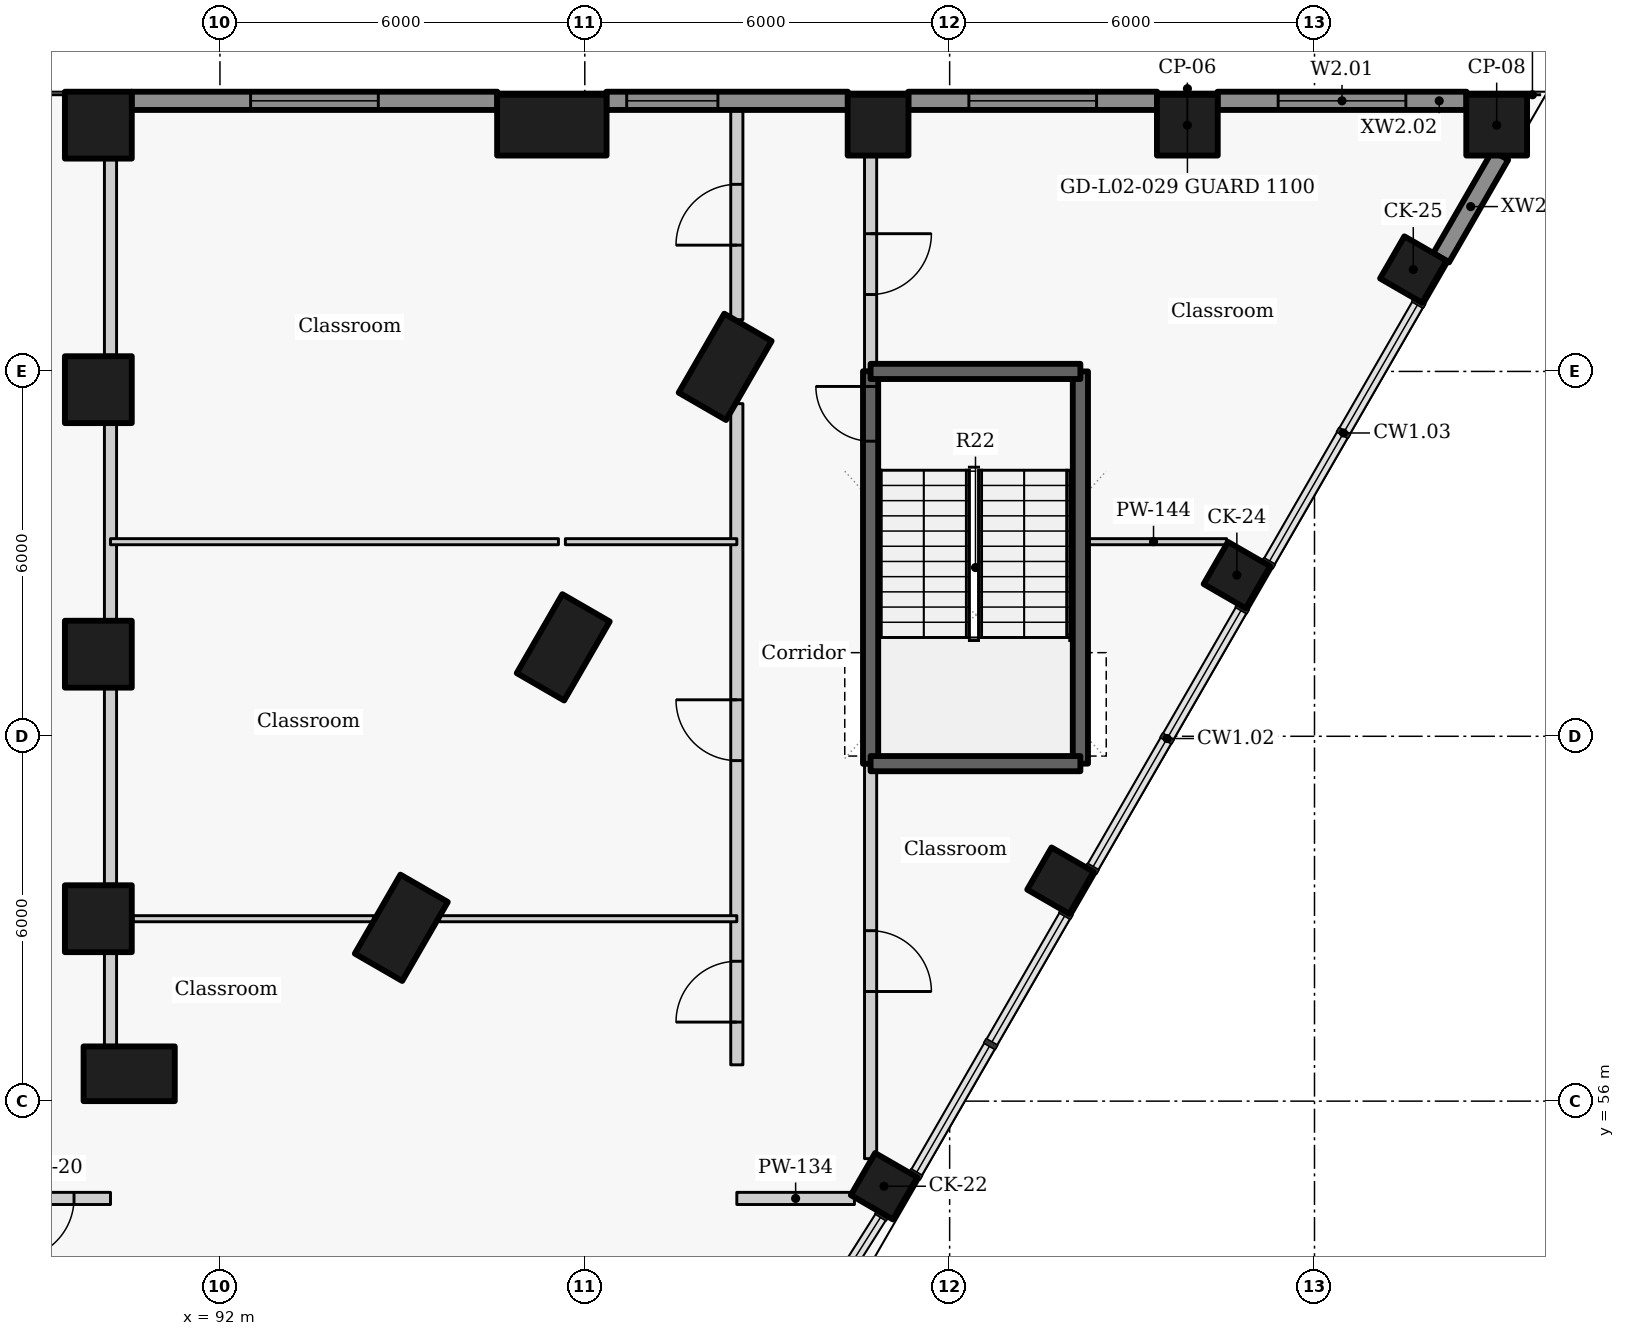
"""IFC4 building model, lengths in metres.
Left out: names, types, materials, properties, quantities, classifications, styles, units other than length and angle.
Written with IfcOpenShell. Run it as: python <this file> out.ifc"""

import sys

from ifc_helpers import new_model, si_unit, direction, frame, frame_2d, origin, origin_2d, place, context, subcontext, project, spatial, rectangle, extrude, element, fill, save


model = new_model("IFC4")
c1 = context("Model", 3, precision=1e-05, world=origin(), true_north=direction((0.0, 1.0)))
c2 = subcontext(c1, "Body", "Model", "MODEL_VIEW")
j1 = project(units=[si_unit("LENGTHUNIT", "METRE"), si_unit("PLANEANGLEUNIT", "RADIAN")], contexts=[c1])
p1 = place(None, origin())
s1 = spatial("IfcSite", under=j1, at=p1, CompositionType="ELEMENT")
p2 = place(p1, origin())
s2 = spatial("IfcBuilding", under=s1, at=p2, CompositionType="ELEMENT")
p3 = place(p2, frame((0.0, 0.0, 11.4)))
s3 = spatial("IfcBuildingStorey", under=s2, at=p3, CompositionType="ELEMENT", Elevation=11.4)
for number, where, z_axis, x_axis in (
    (1, (90.507, 56.45, 0.0), (0.0, 0.0, 1.0), (1.0, 0.0, 0.0)),
    (2, (94.982, 58.851, 0.0), (0.0, 0.0, 1.0), (0.5, 0.866, 0.0)),
    (3, (97.646, 63.463, 0.0), (0.0, 0.0, 1.0), (0.5, 0.866, 0.0)),
    (4, (100.308, 68.075, 0.0), (0.0, 0.0, 1.0), (0.5, 0.866, 0.0)),
):
    element("IfcColumn", number, at=place(p3, frame(where, z_axis=z_axis, x_axis=x_axis)), inside=s3, PredefinedType="COLUMN", context=c2, shape_type="SweptSolid", body=[
        extrude(rectangle(XDim=1.5, YDim=0.9, at=origin_2d()), origin(), (0.0, 0.0, 1.0), 4.2),
    ])
for number, where, z_axis, x_axis in (
    (5, (90.0, 59.0, 0.0), (0.0, 0.0, 1.0), (0.0, 1.0, 0.0)),
    (6, (90.0, 63.35, 0.0), (0.0, 0.0, 1.0), (0.0, 1.0, 0.0)),
    (7, (90.0, 67.7, 0.0), (0.0, 0.0, 1.0), (0.0, 1.0, 0.0)),
    (8, (90.0, 72.05, 0.0), (0.0, 0.0, 1.0), (0.0, 1.0, 0.0)),
):
    element("IfcColumn", number, at=place(p3, frame(where, z_axis=z_axis, x_axis=x_axis)), inside=s3, PredefinedType="COLUMN", context=c2, shape_type="SweptSolid", body=[
        extrude(rectangle(XDim=1.1, YDim=1.1, at=origin_2d()), origin(), (0.0, 0.0, 1.0), 4.2),
    ])
for number, where, z_axis, x_axis in (
    (9, (102.921, 54.6, 0.0), (0.0, 0.0, 1.0), (0.5, 0.866, 0.0)),
    (10, (105.822, 59.625, 0.0), (0.0, 0.0, 1.0), (0.5, 0.866, 0.0)),
    (11, (108.723, 64.65, 0.0), (0.0, 0.0, 1.0), (0.5, 0.866, 0.0)),
    (12, (111.625, 69.675, 0.0), (0.0, 0.0, 1.0), (0.5, 0.866, 0.0)),
):
    element("IfcColumn", number, at=place(p3, frame(where, z_axis=z_axis, x_axis=x_axis)), inside=s3, PredefinedType="COLUMN", context=c2, shape_type="SweptSolid", body=[
        extrude(rectangle(XDim=0.8, YDim=0.8, at=origin_2d()), origin(), (0.0, 0.0, 1.0), 4.2),
    ])
p4 = place(p3, frame((97.458, 72.05, 0.0), z_axis=(0.0, 0.0, 1.0), x_axis=(1.0, 0.0, 0.0)))
e13 = element("IfcColumn", 13, at=p4, inside=s3, PredefinedType="COLUMN", context=c2, shape_type="SweptSolid", body=[
    extrude(rectangle(XDim=1.8, YDim=1.0, at=origin_2d()), origin(), (0.0, 0.0, 1.0), 4.2),
])
for number, where, z_axis, x_axis in (
    (14, (102.823, 72.05, 0.0), (0.0, 0.0, 1.0), (1.0, 0.0, 0.0)),
    (15, (107.909, 72.05, 0.0), (0.0, 0.0, 1.0), (1.0, 0.0, 0.0)),
    (16, (112.996, 72.05, 0.0), (0.0, 0.0, 1.0), (1.0, 0.0, 0.0)),
):
    element("IfcColumn", number, at=place(p3, frame(where, z_axis=z_axis, x_axis=x_axis)), inside=s3, PredefinedType="COLUMN", context=c2, shape_type="SweptSolid", body=[
        extrude(rectangle(XDim=1.0, YDim=1.0, at=origin_2d()), origin(), (0.0, 0.0, 1.0), 4.2),
    ])
p5 = place(p3, frame((112.082, 69.868, 0.0), z_axis=(0.0, 0.0, 1.0), x_axis=(0.500051850797, 0.865995465643, 0.0)))
e17 = element("IfcWall", 17, at=p5, inside=s3, PredefinedType="SOLIDWALL", context=c2, shape_type="SweptSolid", body=[
    extrude(rectangle(XDim=1.946, YDim=0.3, at=frame_2d((0.973, 0.0))), origin(), (0.0, 0.0, 1.0), 3.0),
])
p6 = place(p3, frame((112.5, 72.45, 0.0), z_axis=(0.0, 0.0, 1.0), x_axis=(-1.0, 0.0, 0.0)))
e18 = element("IfcWall", 18, at=p6, inside=s3, PredefinedType="SOLIDWALL", context=c2, shape_type="SweptSolid", body=[
    extrude(rectangle(XDim=4.095, YDim=0.3, at=frame_2d((2.047, 0.0))), origin(), (0.0, 0.0, 1.0), 3.0),
])
p7 = place(p6, frame((0.998, 0.0, 0.9)))
e19 = element("IfcOpeningElement", 19, at=p7, cuts=e18, PredefinedType="OPENING", context=c2, shape_type="SweptSolid", body=[
    extrude(rectangle(XDim=2.1, YDim=2.05, at=frame_2d((1.05, 1.025))), frame((0.0, 0.16, 0.0), z_axis=(0.0, -1.0, 0.0), x_axis=(1.0, 0.0, 0.0)), (0.0, 0.0, 1.0), 0.32),
])
p8 = place(p3, frame((107.413, 72.45, 0.0), z_axis=(0.0, 0.0, 1.0), x_axis=(-1.0, 0.0, 0.0)))
e20 = element("IfcWall", 20, at=p8, inside=s3, PredefinedType="SOLIDWALL", context=c2, shape_type="SweptSolid", body=[
    extrude(rectangle(XDim=4.094, YDim=0.3, at=frame_2d((2.047, 0.0))), origin(), (0.0, 0.0, 1.0), 3.0),
])
p9 = place(p8, frame((0.997, 0.0, 0.9)))
e21 = element("IfcOpeningElement", 21, at=p9, cuts=e20, PredefinedType="OPENING", context=c2, shape_type="SweptSolid", body=[
    extrude(rectangle(XDim=2.1, YDim=2.05, at=frame_2d((1.05, 1.025))), frame((0.0, 0.16, 0.0), z_axis=(0.0, -1.0, 0.0), x_axis=(1.0, 0.0, 0.0)), (0.0, 0.0, 1.0), 0.32),
])
p10 = place(p3, frame((102.327, 72.45, 0.0), z_axis=(0.0, 0.0, 1.0), x_axis=(-1.0, 0.0, 0.0)))
e22 = element("IfcWall", 22, at=p10, inside=s3, PredefinedType="SOLIDWALL", context=c2, shape_type="SweptSolid", body=[
    extrude(rectangle(XDim=3.973, YDim=0.3, at=frame_2d((1.986, 0.0))), origin(), (0.0, 0.0, 1.0), 3.0),
])
p11 = place(p10, frame((2.138, 0.0, 0.9)))
e23 = element("IfcOpeningElement", 23, at=p11, cuts=e22, PredefinedType="OPENING", context=c2, shape_type="SweptSolid", body=[
    extrude(rectangle(XDim=1.5, YDim=2.05, at=frame_2d((0.75, 1.025))), frame((0.0, 0.16, 0.0), z_axis=(0.0, -1.0, 0.0), x_axis=(1.0, 0.0, 0.0)), (0.0, 0.0, 1.0), 0.32),
])
p12 = place(p3, frame((96.562, 72.45, 0.0), z_axis=(0.0, 0.0, 1.0), x_axis=(-1.0, 0.0, 0.0)))
e24 = element("IfcWall", 24, at=p12, inside=s3, PredefinedType="SOLIDWALL", context=c2, shape_type="SweptSolid", body=[
    extrude(rectangle(XDim=6.016, YDim=0.3, at=frame_2d((3.008, 0.0))), origin(), (0.0, 0.0, 1.0), 3.0),
])
p13 = place(p12, frame((1.958, 0.0, 0.9)))
e25 = element("IfcOpeningElement", 25, at=p13, cuts=e24, PredefinedType="OPENING", context=c2, shape_type="SweptSolid", body=[
    extrude(rectangle(XDim=2.1, YDim=2.05, at=frame_2d((1.05, 1.025))), frame((0.0, 0.16, 0.0), z_axis=(0.0, -1.0, 0.0), x_axis=(1.0, 0.0, 0.0)), (0.0, 0.0, 1.0), 0.32),
])
p14 = place(p3, frame((102.7, 61.547, -0.3), z_axis=(0.0, 0.0, 1.0), x_axis=(0.0, 1.0, 0.0)))
e26 = element("IfcWall", 26, at=p14, inside=s3, PredefinedType="SHEAR", context=c2, shape_type="SweptSolid", body=[
    extrude(rectangle(XDim=6.456, YDim=0.25, at=frame_2d((3.228, 0.0))), origin(), (0.0, 0.0, 1.0), 4.2),
])
p15 = place(p14, frame((5.306, 0.0, 0.3)))
e27 = element("IfcOpeningElement", 27, at=p15, cuts=e26, PredefinedType="OPENING", context=c2, shape_type="SweptSolid", body=[
    extrude(rectangle(XDim=0.9, YDim=2.1, at=frame_2d((0.45, 1.05))), frame((0.0, 0.135, 0.0), z_axis=(0.0, -1.0, 0.0), x_axis=(1.0, 0.0, 0.0)), (0.0, 0.0, 1.0), 0.27),
])
p16 = place(p3, frame((102.7, 61.553, 0.0), z_axis=(0.0, 0.0, 1.0), x_axis=(0.0, -1.0, 0.0)))
e28 = element("IfcWall", 28, at=p16, inside=s3, PredefinedType="PARTITIONING", context=c2, shape_type="SweptSolid", body=[
    extrude(rectangle(XDim=6.499, YDim=0.2, at=frame_2d((3.249, 0.0))), origin(), (0.0, 0.0, 1.0), 3.9),
])
p17 = place(p16, frame((2.75, 0.0, 0.0)))
e29 = element("IfcOpeningElement", 29, at=p17, cuts=e28, PredefinedType="OPENING", context=c2, shape_type="SweptSolid", body=[
    extrude(rectangle(XDim=1.0, YDim=2.1, at=frame_2d((0.5, 1.05))), frame((0.0, 0.11, 0.0), z_axis=(0.0, -1.0, 0.0), x_axis=(1.0, 0.0, 0.0)), (0.0, 0.0, 1.0), 0.22),
])
p18 = place(p3, frame((102.7, 71.533, 0.0), z_axis=(0.0, 0.0, 1.0), x_axis=(0.0, -1.0, 0.0)))
e30 = element("IfcWall", 30, at=p18, inside=s3, PredefinedType="PARTITIONING", context=c2, shape_type="SweptSolid", body=[
    extrude(rectangle(XDim=3.536, YDim=0.2, at=frame_2d((1.768, 0.0))), origin(), (0.0, 0.0, 1.0), 3.9),
])
p19 = place(p18, frame((1.268, 0.0, 0.0)))
e31 = element("IfcOpeningElement", 31, at=p19, cuts=e30, PredefinedType="OPENING", context=c2, shape_type="SweptSolid", body=[
    extrude(rectangle(XDim=1.0, YDim=2.1, at=frame_2d((0.5, 1.05))), frame((0.0, 0.11, 0.0), z_axis=(0.0, -1.0, 0.0), x_axis=(1.0, 0.0, 0.0)), (0.0, 0.0, 1.0), 0.22),
])
p20 = place(p3, frame((100.5, 56.597, 0.0), z_axis=(0.0, 0.0, 1.0), x_axis=(0.0, 1.0, 0.0)))
e32 = element("IfcWall", 32, at=p20, inside=s3, PredefinedType="PARTITIONING", context=c2, shape_type="SweptSolid", body=[
    extrude(rectangle(XDim=10.873, YDim=0.2, at=frame_2d((5.437, 0.0))), origin(), (0.0, 0.0, 1.0), 3.9),
])
p21 = place(p20, frame((5.003, 0.0, 0.0)))
e33 = element("IfcOpeningElement", 33, at=p21, cuts=e32, PredefinedType="OPENING", context=c2, shape_type="SweptSolid", body=[
    extrude(rectangle(XDim=1.0, YDim=2.1, at=frame_2d((0.5, 1.05))), frame((0.0, 0.11, 0.0), z_axis=(0.0, -1.0, 0.0), x_axis=(1.0, 0.0, 0.0)), (0.0, 0.0, 1.0), 0.22),
])
p22 = place(p20, frame((0.703, 0.0, 0.0)))
e34 = element("IfcOpeningElement", 34, at=p22, cuts=e32, PredefinedType="OPENING", context=c2, shape_type="SweptSolid", body=[
    extrude(rectangle(XDim=1.0, YDim=2.1, at=frame_2d((0.5, 1.05))), frame((0.0, 0.11, 0.0), z_axis=(0.0, -1.0, 0.0), x_axis=(1.0, 0.0, 0.0)), (0.0, 0.0, 1.0), 0.22),
])
p23 = place(p3, frame((100.5, 68.851, 0.0), z_axis=(0.0, 0.0, 1.0), x_axis=(0.0, 1.0, 0.0)))
e35 = element("IfcWall", 35, at=p23, inside=s3, PredefinedType="PARTITIONING", context=c2, shape_type="SweptSolid", body=[
    extrude(rectangle(XDim=3.449, YDim=0.2, at=frame_2d((1.725, 0.0))), origin(), (0.0, 0.0, 1.0), 3.13),
])
p24 = place(p23, frame((1.226, 0.0, 0.0)))
e36 = element("IfcOpeningElement", 36, at=p24, cuts=e35, PredefinedType="OPENING", context=c2, shape_type="SweptSolid", body=[
    extrude(rectangle(XDim=1.0, YDim=2.1, at=frame_2d((0.5, 1.05))), frame((0.0, 0.11, 0.0), z_axis=(0.0, -1.0, 0.0), x_axis=(1.0, 0.0, 0.0)), (0.0, 0.0, 1.0), 0.22),
])
p25 = place(p3, frame((90.2, 56.917, 0.0), z_axis=(0.0, 0.0, 1.0), x_axis=(0.0, 1.0, 0.0)))
e37 = element("IfcWall", 37, at=p25, inside=s3, PredefinedType="PARTITIONING", context=c2, shape_type="SweptSolid", body=[
    extrude(rectangle(XDim=1.516, YDim=0.2, at=frame_2d((0.758, 0.0))), origin(), (0.0, 0.0, 1.0), 3.9),
])
for number, where, z_axis, x_axis in (
    (38, (90.2, 59.567, 0.0), (0.0, 0.0, 1.0), (0.0, 1.0, 0.0)),
    (39, (90.2, 63.917, 0.0), (0.0, 0.0, 1.0), (0.0, 1.0, 0.0)),
):
    element("IfcWall", number, at=place(p3, frame(where, z_axis=z_axis, x_axis=x_axis)), inside=s3, PredefinedType="PARTITIONING", context=c2, shape_type="SweptSolid", body=[
        extrude(rectangle(XDim=3.216, YDim=0.2, at=frame_2d((1.608, 0.0))), origin(), (0.0, 0.0, 1.0), 3.13),
    ])
p26 = place(p3, frame((90.2, 68.267, 0.0), z_axis=(0.0, 0.0, 1.0), x_axis=(0.0, 1.0, 0.0)))
e40 = element("IfcWall", 40, at=p26, inside=s3, PredefinedType="PARTITIONING", context=c2, shape_type="SweptSolid", body=[
    extrude(rectangle(XDim=3.216, YDim=0.2, at=frame_2d((1.608, 0.0))), origin(), (0.0, 0.0, 1.0), 3.13),
])
p27 = place(p3, frame((106.15, 61.55, -0.3), z_axis=(0.0, 0.0, 1.0), x_axis=(0.0, 1.0, 0.0)))
e41 = element("IfcWall", 41, at=p27, inside=s3, PredefinedType="SHEAR", context=c2, shape_type="SweptSolid", body=[
    extrude(rectangle(XDim=6.45, YDim=0.25, at=frame_2d((3.225, 0.0))), origin(), (0.0, 0.0, 1.0), 4.2),
])
p28 = place(p3, frame((90.2, 54.4, 0.0), z_axis=(0.0, 0.0, 1.0), x_axis=(-1.0, 0.0, 0.0)))
e42 = element("IfcWall", 42, at=p28, inside=s3, PredefinedType="PARTITIONING", context=c2, shape_type="SweptSolid", body=[
    extrude(rectangle(XDim=20.4, YDim=0.2, at=frame_2d((10.2, 0.0))), origin(), (0.0, 0.0, 1.0), 3.9),
])
p29 = place(p28, frame((18.8, 0.0, 0.0)))
e43 = element("IfcOpeningElement", 43, at=p29, cuts=e42, PredefinedType="OPENING", context=c2, shape_type="SweptSolid", body=[
    extrude(rectangle(XDim=1.0, YDim=2.1, at=frame_2d((0.5, 1.05))), frame((0.0, 0.11, 0.0), z_axis=(0.0, -1.0, 0.0), x_axis=(1.0, 0.0, 0.0)), (0.0, 0.0, 1.0), 0.22),
])
p30 = place(p28, frame((0.6, 0.0, 0.0)))
e44 = element("IfcOpeningElement", 44, at=p30, cuts=e42, PredefinedType="OPENING", context=c2, shape_type="SweptSolid", body=[
    extrude(rectangle(XDim=1.0, YDim=2.1, at=frame_2d((0.5, 1.05))), frame((0.0, 0.11, 0.0), z_axis=(0.0, -1.0, 0.0), x_axis=(1.0, 0.0, 0.0)), (0.0, 0.0, 1.0), 0.22),
])
p31 = place(p28, frame((10.1, 0.0, 0.0)))
e45 = element("IfcOpeningElement", 45, at=p31, cuts=e42, PredefinedType="OPENING", context=c2, shape_type="SweptSolid", body=[
    extrude(rectangle(XDim=1.0, YDim=2.1, at=frame_2d((0.5, 1.05))), frame((0.0, 0.11, 0.0), z_axis=(0.0, -1.0, 0.0), x_axis=(1.0, 0.0, 0.0)), (0.0, 0.0, 1.0), 0.22),
])
p32 = place(p3, frame((100.5, 54.4, 0.0), z_axis=(0.0, 0.0, 1.0), x_axis=(1.0, 0.0, 0.0)))
e46 = element("IfcWall", 46, at=p32, inside=s3, PredefinedType="PARTITIONING", context=c2, shape_type="SweptSolid", body=[
    extrude(rectangle(XDim=1.934, YDim=0.2, at=frame_2d((0.967, 0.0))), origin(), (0.0, 0.0, 1.0), 3.9),
])
for number, where, z_axis, x_axis in (
    (47, (102.7, 68.0, -0.3), (0.0, 0.0, 1.0), (1.0, 0.0, 0.0)),
    (48, (102.7, 61.55, -0.3), (0.0, 0.0, 1.0), (1.0, 0.0, 0.0)),
):
    element("IfcWall", number, at=place(p3, frame(where, z_axis=z_axis, x_axis=x_axis)), inside=s3, PredefinedType="SHEAR", context=c2, shape_type="SweptSolid", body=[
        extrude(rectangle(XDim=3.45, YDim=0.25, at=frame_2d((1.725, 0.0))), origin(), (0.0, 0.0, 1.0), 4.2),
    ])
p33 = place(p3, frame((90.2, 65.2, 0.0), z_axis=(0.0, 0.0, 1.0), x_axis=(1.0, 0.0, 0.0)))
e49 = element("IfcWall", 49, at=p33, inside=s3, PredefinedType="PARTITIONING", context=c2, shape_type="SweptSolid", body=[
    extrude(rectangle(XDim=7.366, YDim=0.1, at=frame_2d((3.683, 0.0))), origin(), (0.0, 0.0, 1.0), 3.9),
])
p34 = place(p3, frame((97.68, 65.2, 0.0), z_axis=(0.0, 0.0, 1.0), x_axis=(1.0, 0.0, 0.0)))
e50 = element("IfcWall", 50, at=p34, inside=s3, PredefinedType="PARTITIONING", context=c2, shape_type="SweptSolid", body=[
    extrude(rectangle(XDim=2.82, YDim=0.1, at=frame_2d((1.41, 0.0))), origin(), (0.0, 0.0, 1.0), 2.98),
])
p35 = place(p3, frame((106.15, 65.2, 0.0), z_axis=(0.0, 0.0, 1.0), x_axis=(1.0, 0.0, 0.0)))
e51 = element("IfcWall", 51, at=p35, inside=s3, PredefinedType="PARTITIONING", context=c2, shape_type="SweptSolid", body=[
    extrude(rectangle(XDim=2.406, YDim=0.1, at=frame_2d((1.203, 0.0))), origin(), (0.0, 0.0, 1.0), 3.9),
])
p36 = place(p3, frame((90.57, 59.0, 0.0), z_axis=(0.0, 0.0, 1.0), x_axis=(1.0, 0.0, 0.0)))
e52 = element("IfcWall", 52, at=p36, inside=s3, PredefinedType="PARTITIONING", context=c2, shape_type="SweptSolid", body=[
    extrude(rectangle(XDim=3.956, YDim=0.1, at=frame_2d((1.978, 0.0))), origin(), (0.0, 0.0, 1.0), 3.9),
])
p37 = place(p3, frame((95.612, 59.0, 0.0), z_axis=(0.0, 0.0, 1.0), x_axis=(1.0, 0.0, 0.0)))
e53 = element("IfcWall", 53, at=p37, inside=s3, PredefinedType="PARTITIONING", context=c2, shape_type="SweptSolid", body=[
    extrude(rectangle(XDim=4.888, YDim=0.1, at=frame_2d((2.444, 0.0))), origin(), (0.0, 0.0, 1.0), 3.9),
])
p38 = place(p7, origin())
e54 = element("IfcWindow", 54, at=p38, inside=s3, PartitioningType="SINGLE_PANEL", PredefinedType="WINDOW", context=c2, shape_type="SweptSolid", body=[
    extrude(rectangle(XDim=2.1, YDim=2.05, at=frame_2d((1.05, 1.025))), frame((0.0, 0.03, 0.0), z_axis=(0.0, -1.0, 0.0), x_axis=(1.0, 0.0, 0.0)), (0.0, 0.0, 1.0), 0.06),
])
fill(e19, e54)
p39 = place(p9, origin())
e55 = element("IfcWindow", 55, at=p39, inside=s3, PartitioningType="SINGLE_PANEL", PredefinedType="WINDOW", context=c2, shape_type="SweptSolid", body=[
    extrude(rectangle(XDim=2.1, YDim=2.05, at=frame_2d((1.05, 1.025))), frame((0.0, 0.03, 0.0), z_axis=(0.0, -1.0, 0.0), x_axis=(1.0, 0.0, 0.0)), (0.0, 0.0, 1.0), 0.06),
])
fill(e21, e55)
p40 = place(p11, origin())
e56 = element("IfcWindow", 56, at=p40, inside=s3, PartitioningType="SINGLE_PANEL", PredefinedType="WINDOW", context=c2, shape_type="SweptSolid", body=[
    extrude(rectangle(XDim=1.5, YDim=2.05, at=frame_2d((0.75, 1.025))), frame((0.0, 0.03, 0.0), z_axis=(0.0, -1.0, 0.0), x_axis=(1.0, 0.0, 0.0)), (0.0, 0.0, 1.0), 0.06),
])
fill(e23, e56)
p41 = place(p13, origin())
e57 = element("IfcWindow", 57, at=p41, inside=s3, PartitioningType="SINGLE_PANEL", PredefinedType="WINDOW", context=c2, shape_type="SweptSolid", body=[
    extrude(rectangle(XDim=2.1, YDim=2.05, at=frame_2d((1.05, 1.025))), frame((0.0, 0.03, 0.0), z_axis=(0.0, -1.0, 0.0), x_axis=(1.0, 0.0, 0.0)), (0.0, 0.0, 1.0), 0.06),
])
fill(e25, e57)
p42 = place(p15, origin())
e58 = element("IfcDoor", 58, at=p42, inside=s3, OperationType="SINGLE_SWING_RIGHT", PredefinedType="DOOR", context=c2, shape_type="SweptSolid", body=[
    extrude(rectangle(XDim=0.9, YDim=2.1, at=frame_2d((0.45, 1.05))), frame((0.0, 0.025, 0.0), z_axis=(0.0, -1.0, 0.0), x_axis=(1.0, 0.0, 0.0)), (0.0, 0.0, 1.0), 0.05),
])
fill(e27, e58)
p43 = place(p19, origin())
e59 = element("IfcDoor", 59, at=p43, inside=s3, OperationType="SINGLE_SWING_LEFT", PredefinedType="DOOR", context=c2, shape_type="SweptSolid", body=[
    extrude(rectangle(XDim=1.0, YDim=2.1, at=frame_2d((0.5, 1.05))), frame((0.0, 0.025, 0.0), z_axis=(0.0, -1.0, 0.0), x_axis=(1.0, 0.0, 0.0)), (0.0, 0.0, 1.0), 0.05),
])
fill(e31, e59)
p44 = place(p17, origin())
e60 = element("IfcDoor", 60, at=p44, inside=s3, OperationType="SINGLE_SWING_RIGHT", PredefinedType="DOOR", context=c2, shape_type="SweptSolid", body=[
    extrude(rectangle(XDim=1.0, YDim=2.1, at=frame_2d((0.5, 1.05))), frame((0.0, 0.025, 0.0), z_axis=(0.0, -1.0, 0.0), x_axis=(1.0, 0.0, 0.0)), (0.0, 0.0, 1.0), 0.05),
])
fill(e29, e60)
p45 = place(p24, origin())
e61 = element("IfcDoor", 61, at=p45, inside=s3, OperationType="SINGLE_SWING_LEFT", PredefinedType="DOOR", context=c2, shape_type="SweptSolid", body=[
    extrude(rectangle(XDim=1.0, YDim=2.1, at=frame_2d((0.5, 1.05))), frame((0.0, 0.025, 0.0), z_axis=(0.0, -1.0, 0.0), x_axis=(1.0, 0.0, 0.0)), (0.0, 0.0, 1.0), 0.05),
])
fill(e36, e61)
p46 = place(p21, origin())
e62 = element("IfcDoor", 62, at=p46, inside=s3, OperationType="SINGLE_SWING_RIGHT", PredefinedType="DOOR", context=c2, shape_type="SweptSolid", body=[
    extrude(rectangle(XDim=1.0, YDim=2.1, at=frame_2d((0.5, 1.05))), frame((0.0, 0.025, 0.0), z_axis=(0.0, -1.0, 0.0), x_axis=(1.0, 0.0, 0.0)), (0.0, 0.0, 1.0), 0.05),
])
fill(e33, e62)
p47 = place(p22, origin())
e63 = element("IfcDoor", 63, at=p47, inside=s3, OperationType="SINGLE_SWING_LEFT", PredefinedType="DOOR", context=c2, shape_type="SweptSolid", body=[
    extrude(rectangle(XDim=1.0, YDim=2.1, at=frame_2d((0.5, 1.05))), frame((0.0, 0.025, 0.0), z_axis=(0.0, -1.0, 0.0), x_axis=(1.0, 0.0, 0.0)), (0.0, 0.0, 1.0), 0.05),
])
fill(e34, e63)
p48 = place(p30, origin())
e64 = element("IfcDoor", 64, at=p48, inside=s3, OperationType="SINGLE_SWING_RIGHT", PredefinedType="DOOR", context=c2, shape_type="SweptSolid", body=[
    extrude(rectangle(XDim=1.0, YDim=2.1, at=frame_2d((0.5, 1.05))), frame((0.0, 0.025, 0.0), z_axis=(0.0, -1.0, 0.0), x_axis=(1.0, 0.0, 0.0)), (0.0, 0.0, 1.0), 0.05),
])
fill(e44, e64)
save(model, sys.argv[1])
